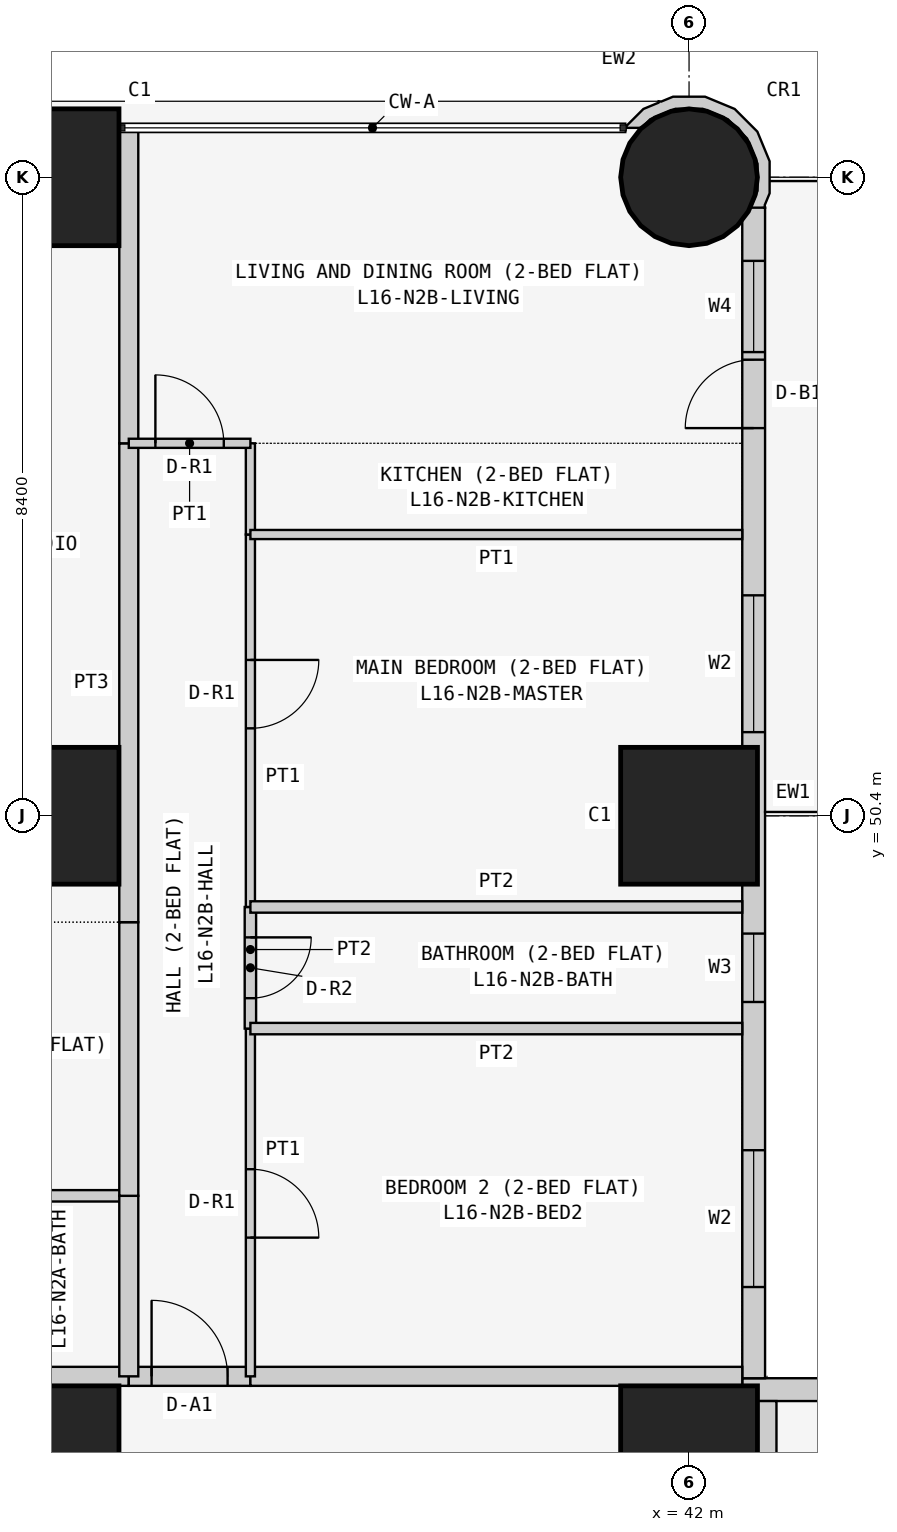
"""IFC4 building model, lengths in metres.
Left out: names, types, materials, properties, quantities, classifications, styles, units other than length and angle.
Written with IfcOpenShell. Run it as: python <this file> out.ifc"""

import sys

from ifc_helpers import new_model, si_unit, direction, frame, frame_2d, origin, origin_2d, place, context, subcontext, project, spatial, polyline, rectangle, circle, outline, extrude, element, fill, save


model = new_model("IFC4")
c1 = context("Model", 3, precision=1e-05, world=origin(), true_north=direction((0.0, 1.0)))
c2 = subcontext(c1, "Body", "Model", "MODEL_VIEW")
j1 = project(units=[si_unit("LENGTHUNIT", "METRE"), si_unit("PLANEANGLEUNIT", "RADIAN")], contexts=[c1])
p1 = place(None, origin())
s1 = spatial("IfcSite", under=j1, at=p1, CompositionType="ELEMENT")
p2 = place(p1, origin())
s2 = spatial("IfcBuilding", under=s1, at=p2, CompositionType="ELEMENT")
p3 = place(p2, frame((0.0, 0.0, 66.9)))
s3 = spatial("IfcBuildingStorey", under=s2, at=p3, CompositionType="ELEMENT", Elevation=66.9)
for number, where, z_axis, x_axis in (
    (1, (33.6, 42.0, 0.0), (0.0, 0.0, 1.0), (1.0, 0.0, 0.0)),
    (2, (33.6, 50.4, 0.0), (0.0, 0.0, 1.0), (1.0, 0.0, 0.0)),
    (3, (33.6, 58.8, 0.0), (0.0, 0.0, 1.0), (1.0, 0.0, 0.0)),
    (4, (42.0, 42.0, 0.0), (0.0, 0.0, 1.0), (1.0, 0.0, 0.0)),
    (5, (42.0, 50.4, 0.0), (0.0, 0.0, 1.0), (1.0, 0.0, 0.0)),
):
    element("IfcColumn", number, at=place(p3, frame(where, z_axis=z_axis, x_axis=x_axis)), inside=s3, PredefinedType="COLUMN", context=c2, shape_type="SweptSolid", body=[
        extrude(rectangle(XDim=1.8, YDim=1.8, at=origin_2d()), origin(), (0.0, 0.0, 1.0), 3.6),
    ])
p4 = place(p3, frame((42.0, 58.8, 0.0), z_axis=(0.0, 0.0, 1.0), x_axis=(1.0, 0.0, 0.0)))
e6 = element("IfcColumn", 6, at=p4, inside=s3, PredefinedType="COLUMN", context=c2, shape_type="SweptSolid", body=[
    extrude(circle(Radius=0.9, at=origin_2d()), origin(), (0.0, 0.0, 1.0), 3.6),
])
p5 = place(p3, frame((58.4, 42.85, 0.0), z_axis=(0.0, 0.0, 1.0), x_axis=(-1.0, 0.0, 0.0)))
e7 = element("IfcWall", 7, at=p5, inside=s3, PredefinedType="SOLIDWALL", context=c2, shape_type="SweptSolid", body=[
    extrude(rectangle(XDim=15.7, YDim=0.3, at=frame_2d((7.85, 0.0))), origin(), (0.0, 0.0, 1.0), 3.45),
])
p6 = place(p5, frame((12.4, 0.0, 0.9)))
e8 = element("IfcOpeningElement", 8, at=p6, cuts=e7, PredefinedType="OPENING", context=c2, shape_type="SweptSolid", body=[
    extrude(rectangle(XDim=1.8, YDim=1.5, at=frame_2d((0.9, 0.75))), frame((0.0, 0.16, 0.0), z_axis=(0.0, -1.0, 0.0), x_axis=(1.0, 0.0, 0.0)), (0.0, 0.0, 1.0), 0.32),
])
p7 = place(p5, frame((9.55, 0.0, 1.5)))
e9 = element("IfcOpeningElement", 9, at=p7, cuts=e7, PredefinedType="OPENING", context=c2, shape_type="SweptSolid", body=[
    extrude(rectangle(XDim=0.9, YDim=0.7, at=frame_2d((0.45, 0.35))), frame((0.0, 0.16, 0.0), z_axis=(0.0, -1.0, 0.0), x_axis=(1.0, 0.0, 0.0)), (0.0, 0.0, 1.0), 0.32),
])
p8 = place(p5, frame((5.1, 0.0, 0.9)))
e10 = element("IfcOpeningElement", 10, at=p8, cuts=e7, PredefinedType="OPENING", context=c2, shape_type="SweptSolid", body=[
    extrude(rectangle(XDim=1.8, YDim=1.5, at=frame_2d((0.9, 0.75))), frame((0.0, 0.16, 0.0), z_axis=(0.0, -1.0, 0.0), x_axis=(1.0, 0.0, 0.0)), (0.0, 0.0, 1.0), 0.32),
])
p9 = place(p5, frame((2.0, 0.0, 0.0)))
e11 = element("IfcOpeningElement", 11, at=p9, cuts=e7, PredefinedType="OPENING", context=c2, shape_type="SweptSolid", body=[
    extrude(rectangle(XDim=0.9, YDim=2.4, at=frame_2d((0.45, 1.2))), frame((0.0, 0.16, 0.0), z_axis=(0.0, -1.0, 0.0), x_axis=(1.0, 0.0, 0.0)), (0.0, 0.0, 1.0), 0.32),
])
p10 = place(p5, frame((0.7, 0.0, 0.9)))
e12 = element("IfcOpeningElement", 12, at=p10, cuts=e7, PredefinedType="OPENING", context=c2, shape_type="SweptSolid", body=[
    extrude(rectangle(XDim=1.2, YDim=1.5, at=frame_2d((0.6, 0.75))), frame((0.0, 0.16, 0.0), z_axis=(0.0, -1.0, 0.0), x_axis=(1.0, 0.0, 0.0)), (0.0, 0.0, 1.0), 0.32),
])
p11 = place(p3, frame((42.85, 43.0, 0.0), z_axis=(0.0, 0.0, 1.0), x_axis=(0.0, 1.0, 0.0)))
e13 = element("IfcWall", 13, at=p11, inside=s3, PredefinedType="SOLIDWALL", context=c2, shape_type="SweptSolid", body=[
    extrude(rectangle(XDim=15.4, YDim=0.3, at=frame_2d((7.7, 0.0))), origin(), (0.0, 0.0, 1.0), 3.45),
])
p12 = place(p11, frame((1.2, 0.0, 0.9)))
e14 = element("IfcOpeningElement", 14, at=p12, cuts=e13, PredefinedType="OPENING", context=c2, shape_type="SweptSolid", body=[
    extrude(rectangle(XDim=1.8, YDim=1.5, at=frame_2d((0.9, 0.75))), frame((0.0, 0.16, 0.0), z_axis=(0.0, -1.0, 0.0), x_axis=(1.0, 0.0, 0.0)), (0.0, 0.0, 1.0), 0.32),
])
p13 = place(p11, frame((4.95, 0.0, 1.5)))
e15 = element("IfcOpeningElement", 15, at=p13, cuts=e13, PredefinedType="OPENING", context=c2, shape_type="SweptSolid", body=[
    extrude(rectangle(XDim=0.9, YDim=0.7, at=frame_2d((0.45, 0.35))), frame((0.0, 0.16, 0.0), z_axis=(0.0, -1.0, 0.0), x_axis=(1.0, 0.0, 0.0)), (0.0, 0.0, 1.0), 0.32),
])
p14 = place(p11, frame((8.5, 0.0, 0.9)))
e16 = element("IfcOpeningElement", 16, at=p14, cuts=e13, PredefinedType="OPENING", context=c2, shape_type="SweptSolid", body=[
    extrude(rectangle(XDim=1.8, YDim=1.5, at=frame_2d((0.9, 0.75))), frame((0.0, 0.16, 0.0), z_axis=(0.0, -1.0, 0.0), x_axis=(1.0, 0.0, 0.0)), (0.0, 0.0, 1.0), 0.32),
])
p15 = place(p11, frame((12.5, 0.0, 0.0)))
e17 = element("IfcOpeningElement", 17, at=p15, cuts=e13, PredefinedType="OPENING", context=c2, shape_type="SweptSolid", body=[
    extrude(rectangle(XDim=0.9, YDim=2.4, at=frame_2d((0.45, 1.2))), frame((0.0, 0.16, 0.0), z_axis=(0.0, -1.0, 0.0), x_axis=(1.0, 0.0, 0.0)), (0.0, 0.0, 1.0), 0.32),
])
p16 = place(p11, frame((13.5, 0.0, 0.9)))
e18 = element("IfcOpeningElement", 18, at=p16, cuts=e13, PredefinedType="OPENING", context=c2, shape_type="SweptSolid", body=[
    extrude(rectangle(XDim=1.2, YDim=1.5, at=frame_2d((0.6, 0.75))), frame((0.0, 0.16, 0.0), z_axis=(0.0, -1.0, 0.0), x_axis=(1.0, 0.0, 0.0)), (0.0, 0.0, 1.0), 0.32),
])
p17 = place(p3, frame((42.91, 58.436, 0.0), z_axis=(0.0, 0.0, 1.0), x_axis=(0.377204953059, 0.926129809145, 0.0)))
e19 = element("IfcWall", 19, at=p17, inside=s3, PredefinedType="SOLIDWALL", context=c2, shape_type="SweptSolid", body=[
    extrude(outline(polyline([(0.769, 1.728), (0.75, 1.723), (0.6, 1.875), (0.295, 2.004), (0.281, 1.998), (0.36, 1.803), (0.509, 1.741), (0.761, 1.486), (0.896, 1.154), (0.894, 0.795), (0.755, 0.465), (0.5, 0.213), (0.168, 0.078), (-0.1, 0.08), (0.001, -0.097), (0.03, -0.08), (0.198, -0.081), (0.589, 0.078), (0.889, 0.374), (1.052, 0.763), (1.055, 1.185), (0.896, 1.575), (0.778, 1.695), (0.769, 1.728)])), origin(), (0.0, 0.0, 1.0), 3.45),
])
p18 = place(p3, frame((32.0, 43.025, 0.0), z_axis=(0.0, 0.0, 1.0), x_axis=(1.0, 0.0, 0.0)))
e20 = element("IfcWall", 20, at=p18, inside=s3, PredefinedType="PARTITIONING", context=c2, shape_type="SweptSolid", body=[
    extrude(rectangle(XDim=2.629, YDim=0.25, at=frame_2d((1.314, 0.0))), origin(), (0.0, 0.0, 1.0), 3.45),
])
p19 = place(p3, frame((34.629, 43.025, 0.0), z_axis=(0.0, 0.0, 1.0), x_axis=(1.0, 0.0, 0.0)))
e21 = element("IfcWall", 21, at=p19, inside=s3, PredefinedType="PARTITIONING", context=c2, shape_type="SweptSolid", body=[
    extrude(rectangle(XDim=1.6, YDim=0.25, at=frame_2d((0.8, 0.0))), origin(), (0.0, 0.0, 1.0), 3.45),
])
p20 = place(p19, frame((0.3, 0.0, 0.0)))
e22 = element("IfcOpeningElement", 22, at=p20, cuts=e21, PredefinedType="OPENING", context=c2, shape_type="SweptSolid", body=[
    extrude(rectangle(XDim=1.0, YDim=2.1, at=frame_2d((0.5, 1.05))), frame((0.0, 0.135, 0.0), z_axis=(0.0, -1.0, 0.0), x_axis=(1.0, 0.0, 0.0)), (0.0, 0.0, 1.0), 0.27),
])
p21 = place(p3, frame((36.229, 43.025, 0.0), z_axis=(0.0, 0.0, 1.0), x_axis=(1.0, 0.0, 0.0)))
e23 = element("IfcWall", 23, at=p21, inside=s3, PredefinedType="PARTITIONING", context=c2, shape_type="SweptSolid", body=[
    extrude(rectangle(XDim=6.471, YDim=0.25, at=frame_2d((3.235, 0.0))), origin(), (0.0, 0.0, 1.0), 3.45),
])
p22 = place(p3, frame((43.025, 42.7, 0.0), z_axis=(0.0, 0.0, 1.0), x_axis=(0.0, -1.0, 0.0)))
e24 = element("IfcWall", 24, at=p22, inside=s3, PredefinedType="PARTITIONING", context=c2, shape_type="SweptSolid", body=[
    extrude(rectangle(XDim=6.871, YDim=0.25, at=frame_2d((3.436, 0.0))), origin(), (0.0, 0.0, 1.0), 3.45),
])
p23 = place(p3, frame((32.0, 45.4, 0.0), z_axis=(0.0, 0.0, 1.0), x_axis=(1.0, 0.0, 0.0)))
e25 = element("IfcWall", 25, at=p23, inside=s3, PredefinedType="PARTITIONING", context=c2, shape_type="SweptSolid", body=[
    extrude(rectangle(XDim=2.629, YDim=0.15, at=frame_2d((1.314, 0.0))), origin(), (0.0, 0.0, 1.0), 3.45),
])
p24 = place(p3, frame((34.629, 45.4, 0.0), z_axis=(0.0, 0.0, 1.0), x_axis=(0.0, -1.0, 0.0)))
e26 = element("IfcWall", 26, at=p24, inside=s3, PredefinedType="PARTITIONING", context=c2, shape_type="SweptSolid", body=[
    extrude(rectangle(XDim=2.375, YDim=0.25, at=frame_2d((1.188, 0.0))), origin(), (0.0, 0.0, 1.0), 3.45),
])
p25 = place(p3, frame((34.629, 49.0, 0.0), z_axis=(0.0, 0.0, 1.0), x_axis=(0.0, -1.0, 0.0)))
e27 = element("IfcWall", 27, at=p25, inside=s3, PredefinedType="PARTITIONING", context=c2, shape_type="SweptSolid", body=[
    extrude(rectangle(XDim=3.6, YDim=0.25, at=frame_2d((1.8, 0.0))), origin(), (0.0, 0.0, 1.0), 3.45),
])
p26 = place(p3, frame((34.629, 55.3, 0.0), z_axis=(0.0, 0.0, 1.0), x_axis=(0.0, -1.0, 0.0)))
e28 = element("IfcWall", 28, at=p26, inside=s3, PredefinedType="PARTITIONING", context=c2, shape_type="SweptSolid", body=[
    extrude(rectangle(XDim=6.3, YDim=0.25, at=frame_2d((3.15, 0.0))), origin(), (0.0, 0.0, 1.0), 3.45),
])
p27 = place(p3, frame((34.629, 59.45, 0.0), z_axis=(0.0, 0.0, 1.0), x_axis=(0.0, -1.0, 0.0)))
e29 = element("IfcWall", 29, at=p27, inside=s3, PredefinedType="PARTITIONING", context=c2, shape_type="SweptSolid", body=[
    extrude(rectangle(XDim=4.15, YDim=0.25, at=frame_2d((2.075, 0.0))), origin(), (0.0, 0.0, 1.0), 3.45),
])
p28 = place(p3, frame((36.229, 47.6, 0.0), z_axis=(0.0, 0.0, 1.0), x_axis=(0.0, -1.0, 0.0)))
e30 = element("IfcWall", 30, at=p28, inside=s3, PredefinedType="PARTITIONING", context=c2, shape_type="SweptSolid", body=[
    extrude(rectangle(XDim=4.575, YDim=0.12, at=frame_2d((2.288, 0.0))), origin(), (0.0, 0.0, 1.0), 3.45),
])
p29 = place(p28, frame((1.85, 0.0, 0.0)))
e31 = element("IfcOpeningElement", 31, at=p29, cuts=e30, PredefinedType="OPENING", context=c2, shape_type="SweptSolid", body=[
    extrude(rectangle(XDim=0.9, YDim=2.1, at=frame_2d((0.45, 1.05))), frame((0.0, 0.07, 0.0), z_axis=(0.0, -1.0, 0.0), x_axis=(1.0, 0.0, 0.0)), (0.0, 0.0, 1.0), 0.14),
])
p30 = place(p3, frame((36.229, 49.2, 0.0), z_axis=(0.0, 0.0, 1.0), x_axis=(0.0, -1.0, 0.0)))
e32 = element("IfcWall", 32, at=p30, inside=s3, PredefinedType="PARTITIONING", context=c2, shape_type="SweptSolid", body=[
    extrude(rectangle(XDim=1.6, YDim=0.15, at=frame_2d((0.8, 0.0))), origin(), (0.0, 0.0, 1.0), 3.45),
])
p31 = place(p30, frame((0.4, 0.0, 0.0)))
e33 = element("IfcOpeningElement", 33, at=p31, cuts=e32, PredefinedType="OPENING", context=c2, shape_type="SweptSolid", body=[
    extrude(rectangle(XDim=0.8, YDim=2.1, at=frame_2d((0.4, 1.05))), frame((0.0, 0.085, 0.0), z_axis=(0.0, -1.0, 0.0), x_axis=(1.0, 0.0, 0.0)), (0.0, 0.0, 1.0), 0.17),
])
p32 = place(p3, frame((36.229, 54.1, 0.0), z_axis=(0.0, 0.0, 1.0), x_axis=(0.0, -1.0, 0.0)))
e34 = element("IfcWall", 34, at=p32, inside=s3, PredefinedType="PARTITIONING", context=c2, shape_type="SweptSolid", body=[
    extrude(rectangle(XDim=4.9, YDim=0.12, at=frame_2d((2.45, 0.0))), origin(), (0.0, 0.0, 1.0), 3.45),
])
p33 = place(p32, frame((1.65, 0.0, 0.0)))
e35 = element("IfcOpeningElement", 35, at=p33, cuts=e34, PredefinedType="OPENING", context=c2, shape_type="SweptSolid", body=[
    extrude(rectangle(XDim=0.9, YDim=2.1, at=frame_2d((0.45, 1.05))), frame((0.0, 0.07, 0.0), z_axis=(0.0, -1.0, 0.0), x_axis=(1.0, 0.0, 0.0)), (0.0, 0.0, 1.0), 0.14),
])
p34 = place(p3, frame((36.229, 55.3, 0.0), z_axis=(0.0, 0.0, 1.0), x_axis=(0.0, -1.0, 0.0)))
e36 = element("IfcWall", 36, at=p34, inside=s3, PredefinedType="PARTITIONING", context=c2, shape_type="SweptSolid", body=[
    extrude(rectangle(XDim=1.2, YDim=0.12, at=frame_2d((0.6, 0.0))), origin(), (0.0, 0.0, 1.0), 3.45),
])
p35 = place(p3, frame((34.629, 55.3, 0.0), z_axis=(0.0, 0.0, 1.0), x_axis=(1.0, 0.0, 0.0)))
e37 = element("IfcWall", 37, at=p35, inside=s3, PredefinedType="PARTITIONING", context=c2, shape_type="SweptSolid", body=[
    extrude(rectangle(XDim=1.6, YDim=0.12, at=frame_2d((0.8, 0.0))), origin(), (0.0, 0.0, 1.0), 3.45),
])
p36 = place(p35, frame((0.35, 0.0, 0.0)))
e38 = element("IfcOpeningElement", 38, at=p36, cuts=e37, PredefinedType="OPENING", context=c2, shape_type="SweptSolid", body=[
    extrude(rectangle(XDim=0.9, YDim=2.1, at=frame_2d((0.45, 1.05))), frame((0.0, 0.07, 0.0), z_axis=(0.0, -1.0, 0.0), x_axis=(1.0, 0.0, 0.0)), (0.0, 0.0, 1.0), 0.14),
])
for number, where, z_axis, x_axis in (
    (39, (36.229, 47.6, 0.0), (0.0, 0.0, 1.0), (1.0, 0.0, 0.0)),
    (40, (36.229, 49.2, 0.0), (0.0, 0.0, 1.0), (1.0, 0.0, 0.0)),
):
    element("IfcWall", number, at=place(p3, frame(where, z_axis=z_axis, x_axis=x_axis)), inside=s3, PredefinedType="PARTITIONING", context=c2, shape_type="SweptSolid", body=[
        extrude(rectangle(XDim=6.471, YDim=0.15, at=frame_2d((3.235, 0.0))), origin(), (0.0, 0.0, 1.0), 3.45),
    ])
p37 = place(p3, frame((36.229, 54.1, 0.0), z_axis=(0.0, 0.0, 1.0), x_axis=(1.0, 0.0, 0.0)))
e41 = element("IfcWall", 41, at=p37, inside=s3, PredefinedType="PARTITIONING", context=c2, shape_type="SweptSolid", body=[
    extrude(rectangle(XDim=6.471, YDim=0.12, at=frame_2d((3.235, 0.0))), origin(), (0.0, 0.0, 1.0), 3.45),
])
p38 = place(p12, origin())
e42 = element("IfcWindow", 42, at=p38, inside=s3, PartitioningType="SINGLE_PANEL", PredefinedType="WINDOW", context=c2, shape_type="SweptSolid", body=[
    extrude(rectangle(XDim=1.8, YDim=1.5, at=frame_2d((0.9, 0.75))), frame((0.0, 0.03, 0.0), z_axis=(0.0, -1.0, 0.0), x_axis=(1.0, 0.0, 0.0)), (0.0, 0.0, 1.0), 0.06),
])
fill(e14, e42)
p39 = place(p13, origin())
e43 = element("IfcWindow", 43, at=p39, inside=s3, PartitioningType="SINGLE_PANEL", PredefinedType="WINDOW", context=c2, shape_type="SweptSolid", body=[
    extrude(rectangle(XDim=0.9, YDim=0.7, at=frame_2d((0.45, 0.35))), frame((0.0, 0.03, 0.0), z_axis=(0.0, -1.0, 0.0), x_axis=(1.0, 0.0, 0.0)), (0.0, 0.0, 1.0), 0.06),
])
fill(e15, e43)
p40 = place(p14, origin())
e44 = element("IfcWindow", 44, at=p40, inside=s3, PartitioningType="SINGLE_PANEL", PredefinedType="WINDOW", context=c2, shape_type="SweptSolid", body=[
    extrude(rectangle(XDim=1.8, YDim=1.5, at=frame_2d((0.9, 0.75))), frame((0.0, 0.03, 0.0), z_axis=(0.0, -1.0, 0.0), x_axis=(1.0, 0.0, 0.0)), (0.0, 0.0, 1.0), 0.06),
])
fill(e16, e44)
p41 = place(p15, origin())
e45 = element("IfcDoor", 45, at=p41, inside=s3, OperationType="SINGLE_SWING_LEFT", PredefinedType="DOOR", context=c2, shape_type="SweptSolid", body=[
    extrude(rectangle(XDim=0.9, YDim=2.4, at=frame_2d((0.45, 1.2))), frame((0.0, 0.025, 0.0), z_axis=(0.0, -1.0, 0.0), x_axis=(1.0, 0.0, 0.0)), (0.0, 0.0, 1.0), 0.05),
])
fill(e17, e45)
p42 = place(p16, origin())
e46 = element("IfcWindow", 46, at=p42, inside=s3, PartitioningType="SINGLE_PANEL", PredefinedType="WINDOW", context=c2, shape_type="SweptSolid", body=[
    extrude(rectangle(XDim=1.2, YDim=1.5, at=frame_2d((0.6, 0.75))), frame((0.0, 0.03, 0.0), z_axis=(0.0, -1.0, 0.0), x_axis=(1.0, 0.0, 0.0)), (0.0, 0.0, 1.0), 0.06),
])
fill(e18, e46)
p43 = place(p20, origin())
e47 = element("IfcDoor", 47, at=p43, inside=s3, OperationType="SINGLE_SWING_LEFT", PredefinedType="DOOR", context=c2, shape_type="SweptSolid", body=[
    extrude(rectangle(XDim=1.0, YDim=2.1, at=frame_2d((0.5, 1.05))), frame((0.0, 0.025, 0.0), z_axis=(0.0, -1.0, 0.0), x_axis=(1.0, 0.0, 0.0)), (0.0, 0.0, 1.0), 0.05),
])
fill(e22, e47)
p44 = place(p29, origin())
e48 = element("IfcDoor", 48, at=p44, inside=s3, OperationType="SINGLE_SWING_RIGHT", PredefinedType="DOOR", context=c2, shape_type="SweptSolid", body=[
    extrude(rectangle(XDim=0.9, YDim=2.1, at=frame_2d((0.45, 1.05))), frame((0.0, 0.025, 0.0), z_axis=(0.0, -1.0, 0.0), x_axis=(1.0, 0.0, 0.0)), (0.0, 0.0, 1.0), 0.05),
])
fill(e31, e48)
p45 = place(p31, origin())
e49 = element("IfcDoor", 49, at=p45, inside=s3, OperationType="SINGLE_SWING_LEFT", PredefinedType="DOOR", context=c2, shape_type="SweptSolid", body=[
    extrude(rectangle(XDim=0.8, YDim=2.1, at=frame_2d((0.4, 1.05))), frame((0.0, 0.025, 0.0), z_axis=(0.0, -1.0, 0.0), x_axis=(1.0, 0.0, 0.0)), (0.0, 0.0, 1.0), 0.05),
])
fill(e33, e49)
p46 = place(p33, origin())
e50 = element("IfcDoor", 50, at=p46, inside=s3, OperationType="SINGLE_SWING_LEFT", PredefinedType="DOOR", context=c2, shape_type="SweptSolid", body=[
    extrude(rectangle(XDim=0.9, YDim=2.1, at=frame_2d((0.45, 1.05))), frame((0.0, 0.025, 0.0), z_axis=(0.0, -1.0, 0.0), x_axis=(1.0, 0.0, 0.0)), (0.0, 0.0, 1.0), 0.05),
])
fill(e35, e50)
p47 = place(p36, origin())
e51 = element("IfcDoor", 51, at=p47, inside=s3, OperationType="SINGLE_SWING_LEFT", PredefinedType="DOOR", context=c2, shape_type="SweptSolid", body=[
    extrude(rectangle(XDim=0.9, YDim=2.1, at=frame_2d((0.45, 1.05))), frame((0.0, 0.025, 0.0), z_axis=(0.0, -1.0, 0.0), x_axis=(1.0, 0.0, 0.0)), (0.0, 0.0, 1.0), 0.05),
])
fill(e38, e51)
save(model, sys.argv[1])
